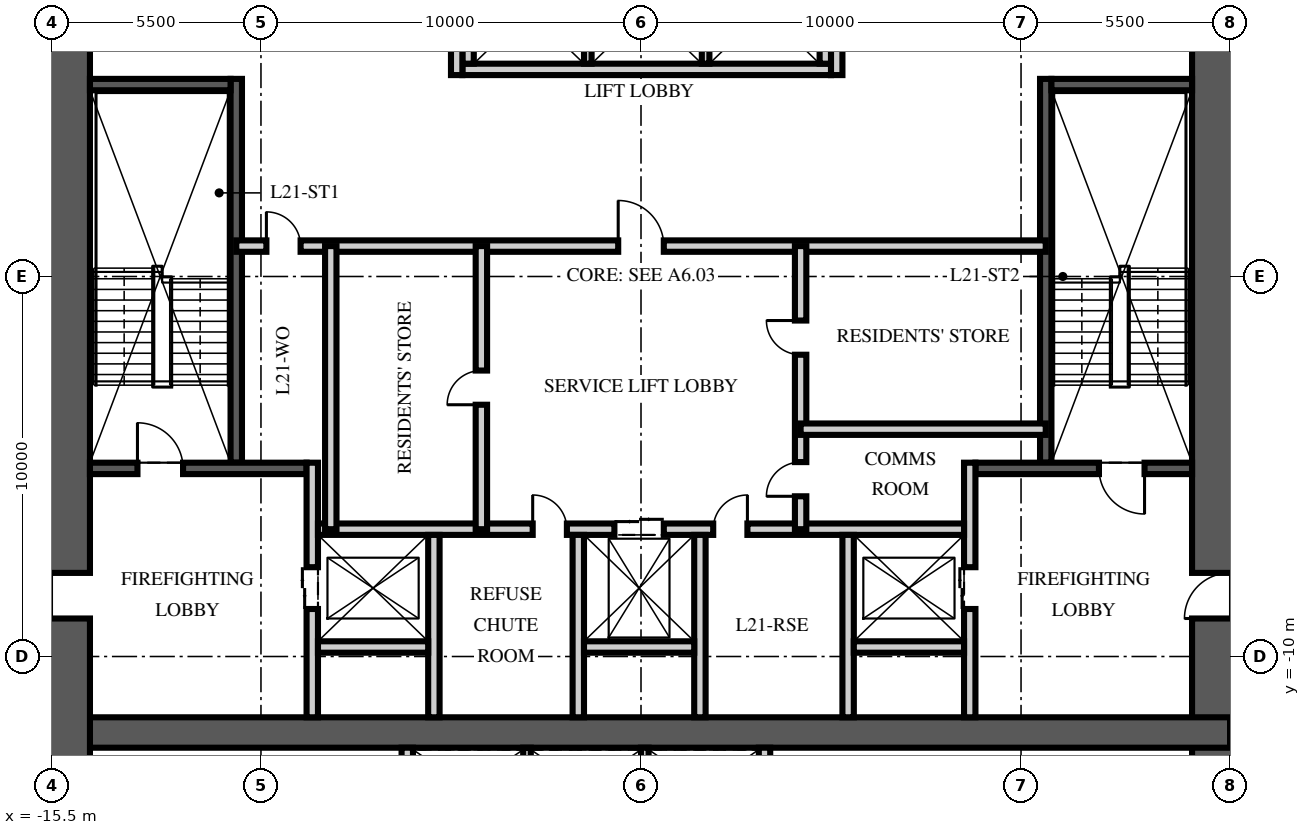
"""IFC4 building model, lengths in metres.
Left out: names, types, materials, properties, quantities, classifications, styles, units other than length and angle.
Written with IfcOpenShell. Run it as: python <this file> out.ifc"""

import sys

from ifc_helpers import new_model, si_unit, direction, frame, frame_2d, origin, place, context, subcontext, project, spatial, rectangle, extrude, element, fill, save


model = new_model("IFC4")
c1 = context("Model", 3, precision=1e-05, world=origin(), true_north=direction((0.0, 1.0)))
c2 = subcontext(c1, "Body", "Model", "MODEL_VIEW")
j1 = project(units=[si_unit("LENGTHUNIT", "METRE"), si_unit("PLANEANGLEUNIT", "RADIAN")], contexts=[c1])
p1 = place(None, origin())
s1 = spatial("IfcSite", under=j1, at=p1, CompositionType="ELEMENT")
p2 = place(p1, origin())
s2 = spatial("IfcBuilding", under=s1, at=p2, CompositionType="ELEMENT")
p3 = place(p2, frame((0.0, 0.0, 84.75)))
s3 = spatial("IfcBuildingStorey", under=s2, at=p3, CompositionType="ELEMENT", Elevation=84.75)
p4 = place(p3, frame((15.5, -15.5, -0.25), z_axis=(0.0, 0.0, 1.0), x_axis=(0.0, 1.0, 0.0)))
e1 = element("IfcWall", 1, at=p4, inside=s3, PredefinedType="SHEAR", context=c2, shape_type="SweptSolid", body=[
    extrude(rectangle(XDim=31.0, YDim=2.0, at=frame_2d((15.5, 0.0))), origin(), (0.0, 0.0, 1.0), 3.75),
])
p5 = place(p4, frame((6.5, 0.0, 0.25)))
e2 = element("IfcOpeningElement", 2, at=p5, cuts=e1, PredefinedType="OPENING", context=c2, shape_type="SweptSolid", body=[
    extrude(rectangle(XDim=1.2, YDim=2.1, at=frame_2d((0.6, 1.05))), frame((0.0, 1.01, 0.0), z_axis=(0.0, -1.0, 0.0), x_axis=(1.0, 0.0, 0.0)), (0.0, 0.0, 1.0), 2.02),
])
p6 = place(p4, frame((23.0, 0.0, 0.25)))
e3 = element("IfcOpeningElement", 3, at=p6, cuts=e1, PredefinedType="OPENING", context=c2, shape_type="SweptSolid", body=[
    extrude(rectangle(XDim=1.8, YDim=2.1, at=frame_2d((0.9, 1.05))), frame((0.0, 1.01, 0.0), z_axis=(0.0, -1.0, 0.0), x_axis=(1.0, 0.0, 0.0)), (0.0, 0.0, 1.0), 2.02),
])
p7 = place(p3, frame((-15.5, -12.0, -0.25), z_axis=(0.0, 0.0, 1.0), x_axis=(1.0, 0.0, 0.0)))
e4 = element("IfcWall", 4, at=p7, inside=s3, PredefinedType="SHEAR", context=c2, shape_type="SweptSolid", body=[
    extrude(rectangle(XDim=31.0, YDim=0.8, at=frame_2d((15.5, 0.0))), origin(), (0.0, 0.0, 1.0), 3.75),
])
p8 = place(p3, frame((-15.5, -15.5, -0.25), z_axis=(0.0, 0.0, 1.0), x_axis=(0.0, 1.0, 0.0)))
e5 = element("IfcWall", 5, at=p8, inside=s3, PredefinedType="SHEAR", context=c2, shape_type="SweptSolid", body=[
    extrude(rectangle(XDim=31.0, YDim=2.0, at=frame_2d((15.5, 0.0))), origin(), (0.0, 0.0, 1.0), 3.75),
])
p9 = place(p8, frame((6.5, 0.0, 0.25)))
e6 = element("IfcOpeningElement", 6, at=p9, cuts=e5, PredefinedType="OPENING", context=c2, shape_type="SweptSolid", body=[
    extrude(rectangle(XDim=1.2, YDim=2.1, at=frame_2d((0.6, 1.05))), frame((0.0, 1.01, 0.0), z_axis=(0.0, -1.0, 0.0), x_axis=(1.0, 0.0, 0.0)), (0.0, 0.0, 1.0), 2.02),
])
p10 = place(p8, frame((23.0, 0.0, 0.25)))
e7 = element("IfcOpeningElement", 7, at=p10, cuts=e5, PredefinedType="OPENING", context=c2, shape_type="SweptSolid", body=[
    extrude(rectangle(XDim=1.8, YDim=2.1, at=frame_2d((0.9, 1.05))), frame((0.0, 1.01, 0.0), z_axis=(0.0, -1.0, 0.0), x_axis=(1.0, 0.0, 0.0)), (0.0, 0.0, 1.0), 2.02),
])
p11 = place(p3, frame((-10.65, -4.9, 0.0), z_axis=(0.0, 0.0, 1.0), x_axis=(0.0, 1.0, 0.0)))
e8 = element("IfcWall", 8, at=p11, inside=s3, PredefinedType="SOLIDWALL", context=c2, shape_type="SweptSolid", body=[
    extrude(rectangle(XDim=10.1, YDim=0.3, at=frame_2d((5.05, 0.0))), origin(), (0.0, 0.0, 1.0), 3.5),
])
p12 = place(p3, frame((-14.5, -5.05, 0.0), z_axis=(0.0, 0.0, 1.0), x_axis=(1.0, 0.0, 0.0)))
e9 = element("IfcWall", 9, at=p12, inside=s3, PredefinedType="SOLIDWALL", context=c2, shape_type="SweptSolid", body=[
    extrude(rectangle(XDim=5.7, YDim=0.3, at=frame_2d((2.85, 0.0))), origin(), (0.0, 0.0, 1.0), 3.5),
])
p13 = place(p12, frame((1.25, 0.0, 0.0)))
e10 = element("IfcOpeningElement", 10, at=p13, cuts=e9, PredefinedType="OPENING", context=c2, shape_type="SweptSolid", body=[
    extrude(rectangle(XDim=1.2, YDim=2.1, at=frame_2d((0.6, 1.05))), frame((0.0, 0.16, 0.0), z_axis=(0.0, -1.0, 0.0), x_axis=(1.0, 0.0, 0.0)), (0.0, 0.0, 1.0), 0.32),
])
p14 = place(p3, frame((-14.5, 5.05, 0.0), z_axis=(0.0, 0.0, 1.0), x_axis=(1.0, 0.0, 0.0)))
e11 = element("IfcWall", 11, at=p14, inside=s3, PredefinedType="SOLIDWALL", context=c2, shape_type="SweptSolid", body=[
    extrude(rectangle(XDim=3.7, YDim=0.3, at=frame_2d((1.85, 0.0))), origin(), (0.0, 0.0, 1.0), 3.5),
])
p15 = place(p3, frame((-8.65, -11.6, 0.0), z_axis=(0.0, 0.0, 1.0), x_axis=(0.0, 1.0, 0.0)))
e12 = element("IfcWall", 12, at=p15, inside=s3, PredefinedType="PARTITIONING", context=c2, shape_type="SweptSolid", body=[
    extrude(rectangle(XDim=6.7, YDim=0.3, at=frame_2d((3.35, 0.0))), origin(), (0.0, 0.0, 1.0), 3.5),
])
p16 = place(p15, frame((2.85, 0.0, 0.0)))
e13 = element("IfcOpeningElement", 13, at=p16, cuts=e12, PredefinedType="OPENING", context=c2, shape_type="SweptSolid", body=[
    extrude(rectangle(XDim=1.1, YDim=2.1, at=frame_2d((0.55, 1.05))), frame((0.0, 0.16, 0.0), z_axis=(0.0, -1.0, 0.0), x_axis=(1.0, 0.0, 0.0)), (0.0, 0.0, 1.0), 0.32),
])
p17 = place(p3, frame((10.65, -4.9, 0.0), z_axis=(0.0, 0.0, 1.0), x_axis=(0.0, 1.0, 0.0)))
e14 = element("IfcWall", 14, at=p17, inside=s3, PredefinedType="SOLIDWALL", context=c2, shape_type="SweptSolid", body=[
    extrude(rectangle(XDim=10.1, YDim=0.3, at=frame_2d((5.05, 0.0))), origin(), (0.0, 0.0, 1.0), 3.5),
])
p18 = place(p3, frame((14.5, -5.05, 0.0), z_axis=(0.0, 0.0, 1.0), x_axis=(-1.0, 0.0, 0.0)))
e15 = element("IfcWall", 15, at=p18, inside=s3, PredefinedType="SOLIDWALL", context=c2, shape_type="SweptSolid", body=[
    extrude(rectangle(XDim=5.7, YDim=0.3, at=frame_2d((2.85, 0.0))), origin(), (0.0, 0.0, 1.0), 3.5),
])
p19 = place(p18, frame((1.25, 0.0, 0.0)))
e16 = element("IfcOpeningElement", 16, at=p19, cuts=e15, PredefinedType="OPENING", context=c2, shape_type="SweptSolid", body=[
    extrude(rectangle(XDim=1.2, YDim=2.1, at=frame_2d((0.6, 1.05))), frame((0.0, 0.16, 0.0), z_axis=(0.0, -1.0, 0.0), x_axis=(1.0, 0.0, 0.0)), (0.0, 0.0, 1.0), 0.32),
])
p20 = place(p3, frame((14.5, 5.05, 0.0), z_axis=(0.0, 0.0, 1.0), x_axis=(-1.0, 0.0, 0.0)))
e17 = element("IfcWall", 17, at=p20, inside=s3, PredefinedType="SOLIDWALL", context=c2, shape_type="SweptSolid", body=[
    extrude(rectangle(XDim=3.7, YDim=0.3, at=frame_2d((1.85, 0.0))), origin(), (0.0, 0.0, 1.0), 3.5),
])
p21 = place(p3, frame((8.65, -11.6, 0.0), z_axis=(0.0, 0.0, 1.0), x_axis=(0.0, 1.0, 0.0)))
e18 = element("IfcWall", 18, at=p21, inside=s3, PredefinedType="PARTITIONING", context=c2, shape_type="SweptSolid", body=[
    extrude(rectangle(XDim=6.7, YDim=0.3, at=frame_2d((3.35, 0.0))), origin(), (0.0, 0.0, 1.0), 3.5),
])
p22 = place(p21, frame((2.85, 0.0, 0.0)))
e19 = element("IfcOpeningElement", 19, at=p22, cuts=e18, PredefinedType="OPENING", context=c2, shape_type="SweptSolid", body=[
    extrude(rectangle(XDim=1.1, YDim=2.1, at=frame_2d((0.55, 1.05))), frame((0.0, 0.16, 0.0), z_axis=(0.0, -1.0, 0.0), x_axis=(1.0, 0.0, 0.0)), (0.0, 0.0, 1.0), 0.32),
])
p23 = place(p3, frame((-8.5, -6.65, 0.0), z_axis=(0.0, 0.0, 1.0), x_axis=(1.0, 0.0, 0.0)))
e20 = element("IfcWall", 20, at=p23, inside=s3, PredefinedType="PARTITIONING", context=c2, shape_type="SweptSolid", body=[
    extrude(rectangle(XDim=17.0, YDim=0.3, at=frame_2d((8.5, 0.0))), origin(), (0.0, 0.0, 1.0), 3.5),
])
p24 = place(p23, frame((7.8, 0.0, 0.0)))
e21 = element("IfcOpeningElement", 21, at=p24, cuts=e20, PredefinedType="OPENING", context=c2, shape_type="SweptSolid", body=[
    extrude(rectangle(XDim=1.3, YDim=2.4, at=frame_2d((0.65, 1.2))), frame((0.0, 0.16, 0.0), z_axis=(0.0, -1.0, 0.0), x_axis=(1.0, 0.0, 0.0)), (0.0, 0.0, 1.0), 0.32),
])
p25 = place(p23, frame((5.65, 0.0, 0.0)))
e22 = element("IfcOpeningElement", 22, at=p25, cuts=e20, PredefinedType="OPENING", context=c2, shape_type="SweptSolid", body=[
    extrude(rectangle(XDim=0.9, YDim=2.1, at=frame_2d((0.45, 1.05))), frame((0.0, 0.16, 0.0), z_axis=(0.0, -1.0, 0.0), x_axis=(1.0, 0.0, 0.0)), (0.0, 0.0, 1.0), 0.32),
])
p26 = place(p23, frame((10.4, 0.0, 0.0)))
e23 = element("IfcOpeningElement", 23, at=p26, cuts=e20, PredefinedType="OPENING", context=c2, shape_type="SweptSolid", body=[
    extrude(rectangle(XDim=0.9, YDim=2.1, at=frame_2d((0.45, 1.05))), frame((0.0, 0.16, 0.0), z_axis=(0.0, -1.0, 0.0), x_axis=(1.0, 0.0, 0.0)), (0.0, 0.0, 1.0), 0.32),
])
for number, where, z_axis, x_axis in (
    (24, (-5.45, -11.6, 0.0), (0.0, 0.0, 1.0), (0.0, 1.0, 0.0)),
    (25, (-1.65, -11.6, 0.0), (0.0, 0.0, 1.0), (0.0, 1.0, 0.0)),
    (26, (1.55, -11.6, 0.0), (0.0, 0.0, 1.0), (0.0, 1.0, 0.0)),
    (27, (5.45, -11.6, 0.0), (0.0, 0.0, 1.0), (0.0, 1.0, 0.0)),
):
    element("IfcWall", number, at=place(p3, frame(where, z_axis=z_axis, x_axis=x_axis)), inside=s3, PredefinedType="PARTITIONING", context=c2, shape_type="SweptSolid", body=[
        extrude(rectangle(XDim=4.8, YDim=0.3, at=frame_2d((2.4, 0.0))), origin(), (0.0, 0.0, 1.0), 3.5),
    ])
for number, where, z_axis, x_axis in (
    (28, (-8.5, -9.75, 0.0), (0.0, 0.0, 1.0), (1.0, 0.0, 0.0)),
    (29, (-1.5, -9.75, 0.0), (0.0, 0.0, 1.0), (1.0, 0.0, 0.0)),
    (30, (5.6, -9.75, 0.0), (0.0, 0.0, 1.0), (1.0, 0.0, 0.0)),
):
    element("IfcWall", number, at=place(p3, frame(where, z_axis=z_axis, x_axis=x_axis)), inside=s3, PredefinedType="PARTITIONING", context=c2, shape_type="SweptSolid", body=[
        extrude(rectangle(XDim=2.9, YDim=0.3, at=frame_2d((1.45, 0.0))), origin(), (0.0, 0.0, 1.0), 3.5),
    ])
p27 = place(p3, frame((-4.7, 5.45, 0.0), z_axis=(0.0, 0.0, 1.0), x_axis=(1.0, 0.0, 0.0)))
e31 = element("IfcWall", 31, at=p27, inside=s3, PredefinedType="PARTITIONING", context=c2, shape_type="SweptSolid", body=[
    extrude(rectangle(XDim=9.7, YDim=0.3, at=frame_2d((4.85, 0.0))), origin(), (0.0, 0.0, 1.0), 3.5),
])
for number, where, z_axis, x_axis in (
    (32, (-4.55, 5.6, 0.0), (0.0, 0.0, 1.0), (0.0, 1.0, 0.0)),
    (33, (4.85, 5.6, 0.0), (0.0, 0.0, 1.0), (0.0, 1.0, 0.0)),
):
    element("IfcWall", number, at=place(p3, frame(where, z_axis=z_axis, x_axis=x_axis)), inside=s3, PredefinedType="PARTITIONING", context=c2, shape_type="SweptSolid", body=[
        extrude(rectangle(XDim=2.8, YDim=0.3, at=frame_2d((1.4, 0.0))), origin(), (0.0, 0.0, 1.0), 3.5),
    ])
for number, where, z_axis, x_axis in (
    (34, (-1.4, 5.6, 0.0), (0.0, 0.0, 1.0), (0.0, 1.0, 0.0)),
    (35, (1.7, 5.6, 0.0), (0.0, 0.0, 1.0), (0.0, 1.0, 0.0)),
):
    element("IfcWall", number, at=place(p3, frame(where, z_axis=z_axis, x_axis=x_axis)), inside=s3, PredefinedType="PARTITIONING", context=c2, shape_type="SweptSolid", body=[
        extrude(rectangle(XDim=2.8, YDim=0.2, at=frame_2d((1.4, 0.0))), origin(), (0.0, 0.0, 1.0), 3.5),
    ])
for number, where, z_axis, x_axis in (
    (36, (-6.15, -14.5, 0.0), (0.0, 0.0, 1.0), (0.0, 1.0, 0.0)),
    (37, (3.25, -14.5, 0.0), (0.0, 0.0, 1.0), (0.0, 1.0, 0.0)),
):
    element("IfcWall", number, at=place(p3, frame(where, z_axis=z_axis, x_axis=x_axis)), inside=s3, PredefinedType="PARTITIONING", context=c2, shape_type="SweptSolid", body=[
        extrude(rectangle(XDim=2.1, YDim=0.3, at=frame_2d((1.05, 0.0))), origin(), (0.0, 0.0, 1.0), 3.5),
    ])
for number, where, z_axis, x_axis in (
    (38, (-3.0, -14.5, 0.0), (0.0, 0.0, 1.0), (0.0, 1.0, 0.0)),
    (39, (0.1, -14.5, 0.0), (0.0, 0.0, 1.0), (0.0, 1.0, 0.0)),
):
    element("IfcWall", number, at=place(p3, frame(where, z_axis=z_axis, x_axis=x_axis)), inside=s3, PredefinedType="PARTITIONING", context=c2, shape_type="SweptSolid", body=[
        extrude(rectangle(XDim=2.1, YDim=0.2, at=frame_2d((1.05, 0.0))), origin(), (0.0, 0.0, 1.0), 3.5),
    ])
p28 = place(p3, frame((-10.65, 0.8, 0.0), z_axis=(0.0, 0.0, 1.0), x_axis=(1.0, 0.0, 0.0)))
e40 = element("IfcWall", 40, at=p28, inside=s3, PredefinedType="PARTITIONING", context=c2, shape_type="SweptSolid", body=[
    extrude(rectangle(XDim=21.3, YDim=0.3, at=frame_2d((10.65, 0.0))), origin(), (0.0, 0.0, 1.0), 3.5),
])
p29 = place(p28, frame((10.05, 0.0, 0.0)))
e41 = element("IfcOpeningElement", 41, at=p29, cuts=e40, PredefinedType="OPENING", context=c2, shape_type="SweptSolid", body=[
    extrude(rectangle(XDim=1.2, YDim=2.1, at=frame_2d((0.6, 1.05))), frame((0.0, 0.16, 0.0), z_axis=(0.0, -1.0, 0.0), x_axis=(1.0, 0.0, 0.0)), (0.0, 0.0, 1.0), 0.32),
])
p30 = place(p28, frame((0.793, 0.0, 0.0)))
e42 = element("IfcOpeningElement", 42, at=p30, cuts=e40, PredefinedType="OPENING", context=c2, shape_type="SweptSolid", body=[
    extrude(rectangle(XDim=0.9, YDim=2.1, at=frame_2d((0.45, 1.05))), frame((0.0, 0.16, 0.0), z_axis=(0.0, -1.0, 0.0), x_axis=(1.0, 0.0, 0.0)), (0.0, 0.0, 1.0), 0.32),
])
p31 = place(p3, frame((-4.2, -6.65, 0.0), z_axis=(0.0, 0.0, 1.0), x_axis=(0.0, 1.0, 0.0)))
e43 = element("IfcWall", 43, at=p31, inside=s3, PredefinedType="PARTITIONING", context=c2, shape_type="SweptSolid", body=[
    extrude(rectangle(XDim=7.45, YDim=0.3, at=frame_2d((3.725, 0.0))), origin(), (0.0, 0.0, 1.0), 3.5),
])
p32 = place(p31, frame((3.275, 0.0, 0.0)))
e44 = element("IfcOpeningElement", 44, at=p32, cuts=e43, PredefinedType="OPENING", context=c2, shape_type="SweptSolid", body=[
    extrude(rectangle(XDim=0.9, YDim=2.1, at=frame_2d((0.45, 1.05))), frame((0.0, 0.16, 0.0), z_axis=(0.0, -1.0, 0.0), x_axis=(1.0, 0.0, 0.0)), (0.0, 0.0, 1.0), 0.32),
])
p33 = place(p3, frame((4.2, -6.65, 0.0), z_axis=(0.0, 0.0, 1.0), x_axis=(0.0, 1.0, 0.0)))
e45 = element("IfcWall", 45, at=p33, inside=s3, PredefinedType="PARTITIONING", context=c2, shape_type="SweptSolid", body=[
    extrude(rectangle(XDim=7.45, YDim=0.3, at=frame_2d((3.725, 0.0))), origin(), (0.0, 0.0, 1.0), 3.5),
])
p34 = place(p33, frame((0.866, 0.0, 0.0)))
e46 = element("IfcOpeningElement", 46, at=p34, cuts=e45, PredefinedType="OPENING", context=c2, shape_type="SweptSolid", body=[
    extrude(rectangle(XDim=0.9, YDim=2.1, at=frame_2d((0.45, 1.05))), frame((0.0, 0.16, 0.0), z_axis=(0.0, -1.0, 0.0), x_axis=(1.0, 0.0, 0.0)), (0.0, 0.0, 1.0), 0.32),
])
p35 = place(p33, frame((4.591, 0.0, 0.0)))
e47 = element("IfcOpeningElement", 47, at=p35, cuts=e45, PredefinedType="OPENING", context=c2, shape_type="SweptSolid", body=[
    extrude(rectangle(XDim=0.9, YDim=2.1, at=frame_2d((0.45, 1.05))), frame((0.0, 0.16, 0.0), z_axis=(0.0, -1.0, 0.0), x_axis=(1.0, 0.0, 0.0)), (0.0, 0.0, 1.0), 0.32),
])
p36 = place(p3, frame((-8.163, -6.65, 0.0), z_axis=(0.0, 0.0, 1.0), x_axis=(0.0, 1.0, 0.0)))
e48 = element("IfcWall", 48, at=p36, inside=s3, PredefinedType="PARTITIONING", context=c2, shape_type="SweptSolid", body=[
    extrude(rectangle(XDim=7.45, YDim=0.3, at=frame_2d((3.725, 0.0))), origin(), (0.0, 0.0, 1.0), 3.5),
])
p37 = place(p3, frame((10.65, -4.018, 0.0), z_axis=(0.0, 0.0, 1.0), x_axis=(-1.0, 0.0, 0.0)))
e49 = element("IfcWall", 49, at=p37, inside=s3, PredefinedType="PARTITIONING", context=c2, shape_type="SweptSolid", body=[
    extrude(rectangle(XDim=6.45, YDim=0.3, at=frame_2d((3.225, 0.0))), origin(), (0.0, 0.0, 1.0), 3.5),
])
p38 = place(p3, frame((-4.85, 5.3, 0.0), z_axis=(0.0, 0.0, 1.0), x_axis=(0.0, 1.0, 0.0)))
e50 = element("IfcWall", 50, at=p38, inside=s3, PredefinedType="PARTITIONING", context=c2, shape_type="SweptSolid", body=[
    extrude(rectangle(XDim=6.3, YDim=0.3, at=frame_2d((3.15, 0.0))), origin(), (0.0, 0.0, 1.0), 3.5),
])
p39 = place(p38, frame((4.35, 0.0, 0.0)))
e51 = element("IfcOpeningElement", 51, at=p39, cuts=e50, PredefinedType="OPENING", context=c2, shape_type="SweptSolid", body=[
    extrude(rectangle(XDim=0.9, YDim=2.1, at=frame_2d((0.45, 1.05))), frame((0.0, 0.16, 0.0), z_axis=(0.0, -1.0, 0.0), x_axis=(1.0, 0.0, 0.0)), (0.0, 0.0, 1.0), 0.32),
])
p40 = place(p3, frame((5.15, 5.3, 0.0), z_axis=(0.0, 0.0, 1.0), x_axis=(0.0, 1.0, 0.0)))
e52 = element("IfcWall", 52, at=p40, inside=s3, PredefinedType="PARTITIONING", context=c2, shape_type="SweptSolid", body=[
    extrude(rectangle(XDim=6.3, YDim=0.3, at=frame_2d((3.15, 0.0))), origin(), (0.0, 0.0, 1.0), 3.5),
])
p41 = place(p40, frame((4.35, 0.0, 0.0)))
e53 = element("IfcOpeningElement", 53, at=p41, cuts=e52, PredefinedType="OPENING", context=c2, shape_type="SweptSolid", body=[
    extrude(rectangle(XDim=0.9, YDim=2.1, at=frame_2d((0.45, 1.05))), frame((0.0, 0.16, 0.0), z_axis=(0.0, -1.0, 0.0), x_axis=(1.0, 0.0, 0.0)), (0.0, 0.0, 1.0), 0.32),
])
p42 = place(p13, origin())
e54 = element("IfcDoor", 54, at=p42, inside=s3, OperationType="SINGLE_SWING_LEFT", PredefinedType="DOOR", context=c2, shape_type="SweptSolid", body=[
    extrude(rectangle(XDim=1.2, YDim=2.1, at=frame_2d((0.6, 1.05))), frame((0.0, 0.025, 0.0), z_axis=(0.0, -1.0, 0.0), x_axis=(1.0, 0.0, 0.0)), (0.0, 0.0, 1.0), 0.05),
])
fill(e10, e54)
p43 = place(p9, origin())
e55 = element("IfcDoor", 55, at=p43, inside=s3, OperationType="SINGLE_SWING_LEFT", PredefinedType="DOOR", context=c2, shape_type="SweptSolid", body=[
    extrude(rectangle(XDim=1.2, YDim=2.1, at=frame_2d((0.6, 1.05))), frame((0.0, 0.025, 0.0), z_axis=(0.0, -1.0, 0.0), x_axis=(1.0, 0.0, 0.0)), (0.0, 0.0, 1.0), 0.05),
])
fill(e6, e55)
p44 = place(p19, origin())
e56 = element("IfcDoor", 56, at=p44, inside=s3, OperationType="SINGLE_SWING_LEFT", PredefinedType="DOOR", context=c2, shape_type="SweptSolid", body=[
    extrude(rectangle(XDim=1.2, YDim=2.1, at=frame_2d((0.6, 1.05))), frame((0.0, 0.025, 0.0), z_axis=(0.0, -1.0, 0.0), x_axis=(1.0, 0.0, 0.0)), (0.0, 0.0, 1.0), 0.05),
])
fill(e16, e56)
p45 = place(p5, origin())
e57 = element("IfcDoor", 57, at=p45, inside=s3, OperationType="SINGLE_SWING_LEFT", PredefinedType="DOOR", context=c2, shape_type="SweptSolid", body=[
    extrude(rectangle(XDim=1.2, YDim=2.1, at=frame_2d((0.6, 1.05))), frame((0.0, 0.025, 0.0), z_axis=(0.0, -1.0, 0.0), x_axis=(1.0, 0.0, 0.0)), (0.0, 0.0, 1.0), 0.05),
])
fill(e2, e57)
p46 = place(p16, origin())
e58 = element("IfcDoor", 58, at=p46, inside=s3, OperationType="DOUBLE_DOOR_SLIDING", PredefinedType="DOOR", context=c2, shape_type="SweptSolid", body=[
    extrude(rectangle(XDim=1.1, YDim=2.1, at=frame_2d((0.55, 1.05))), frame((0.0, 0.025, 0.0), z_axis=(0.0, -1.0, 0.0), x_axis=(1.0, 0.0, 0.0)), (0.0, 0.0, 1.0), 0.05),
])
fill(e13, e58)
p47 = place(p22, origin())
e59 = element("IfcDoor", 59, at=p47, inside=s3, OperationType="DOUBLE_DOOR_SLIDING", PredefinedType="DOOR", context=c2, shape_type="SweptSolid", body=[
    extrude(rectangle(XDim=1.1, YDim=2.1, at=frame_2d((0.55, 1.05))), frame((0.0, 0.025, 0.0), z_axis=(0.0, -1.0, 0.0), x_axis=(1.0, 0.0, 0.0)), (0.0, 0.0, 1.0), 0.05),
])
fill(e19, e59)
p48 = place(p24, origin())
e60 = element("IfcDoor", 60, at=p48, inside=s3, OperationType="DOUBLE_DOOR_SLIDING", PredefinedType="DOOR", context=c2, shape_type="SweptSolid", body=[
    extrude(rectangle(XDim=1.3, YDim=2.4, at=frame_2d((0.65, 1.2))), frame((0.0, 0.025, 0.0), z_axis=(0.0, -1.0, 0.0), x_axis=(1.0, 0.0, 0.0)), (0.0, 0.0, 1.0), 0.05),
])
fill(e21, e60)
p49 = place(p29, origin())
e61 = element("IfcDoor", 61, at=p49, inside=s3, OperationType="SINGLE_SWING_LEFT", PredefinedType="DOOR", context=c2, shape_type="SweptSolid", body=[
    extrude(rectangle(XDim=1.2, YDim=2.1, at=frame_2d((0.6, 1.05))), frame((0.0, 0.025, 0.0), z_axis=(0.0, -1.0, 0.0), x_axis=(1.0, 0.0, 0.0)), (0.0, 0.0, 1.0), 0.05),
])
fill(e41, e61)
p50 = place(p25, origin())
e62 = element("IfcDoor", 62, at=p50, inside=s3, OperationType="SINGLE_SWING_LEFT", PredefinedType="DOOR", context=c2, shape_type="SweptSolid", body=[
    extrude(rectangle(XDim=0.9, YDim=2.1, at=frame_2d((0.45, 1.05))), frame((0.0, 0.025, 0.0), z_axis=(0.0, -1.0, 0.0), x_axis=(1.0, 0.0, 0.0)), (0.0, 0.0, 1.0), 0.05),
])
fill(e22, e62)
p51 = place(p26, origin())
e63 = element("IfcDoor", 63, at=p51, inside=s3, OperationType="SINGLE_SWING_RIGHT", PredefinedType="DOOR", context=c2, shape_type="SweptSolid", body=[
    extrude(rectangle(XDim=0.9, YDim=2.1, at=frame_2d((0.45, 1.05))), frame((0.0, 0.025, 0.0), z_axis=(0.0, -1.0, 0.0), x_axis=(1.0, 0.0, 0.0)), (0.0, 0.0, 1.0), 0.05),
])
fill(e23, e63)
p52 = place(p32, origin())
e64 = element("IfcDoor", 64, at=p52, inside=s3, OperationType="SINGLE_SWING_LEFT", PredefinedType="DOOR", context=c2, shape_type="SweptSolid", body=[
    extrude(rectangle(XDim=0.9, YDim=2.1, at=frame_2d((0.45, 1.05))), frame((0.0, 0.025, 0.0), z_axis=(0.0, -1.0, 0.0), x_axis=(1.0, 0.0, 0.0)), (0.0, 0.0, 1.0), 0.05),
])
fill(e44, e64)
p53 = place(p30, origin())
e65 = element("IfcDoor", 65, at=p53, inside=s3, OperationType="SINGLE_SWING_LEFT", PredefinedType="DOOR", context=c2, shape_type="SweptSolid", body=[
    extrude(rectangle(XDim=0.9, YDim=2.1, at=frame_2d((0.45, 1.05))), frame((0.0, 0.025, 0.0), z_axis=(0.0, -1.0, 0.0), x_axis=(1.0, 0.0, 0.0)), (0.0, 0.0, 1.0), 0.05),
])
fill(e42, e65)
p54 = place(p34, origin())
e66 = element("IfcDoor", 66, at=p54, inside=s3, OperationType="SINGLE_SWING_LEFT", PredefinedType="DOOR", context=c2, shape_type="SweptSolid", body=[
    extrude(rectangle(XDim=0.9, YDim=2.1, at=frame_2d((0.45, 1.05))), frame((0.0, 0.025, 0.0), z_axis=(0.0, -1.0, 0.0), x_axis=(1.0, 0.0, 0.0)), (0.0, 0.0, 1.0), 0.05),
])
fill(e46, e66)
p55 = place(p35, origin())
e67 = element("IfcDoor", 67, at=p55, inside=s3, OperationType="SINGLE_SWING_RIGHT", PredefinedType="DOOR", context=c2, shape_type="SweptSolid", body=[
    extrude(rectangle(XDim=0.9, YDim=2.1, at=frame_2d((0.45, 1.05))), frame((0.0, 0.025, 0.0), z_axis=(0.0, -1.0, 0.0), x_axis=(1.0, 0.0, 0.0)), (0.0, 0.0, 1.0), 0.05),
])
fill(e47, e67)
save(model, sys.argv[1])
